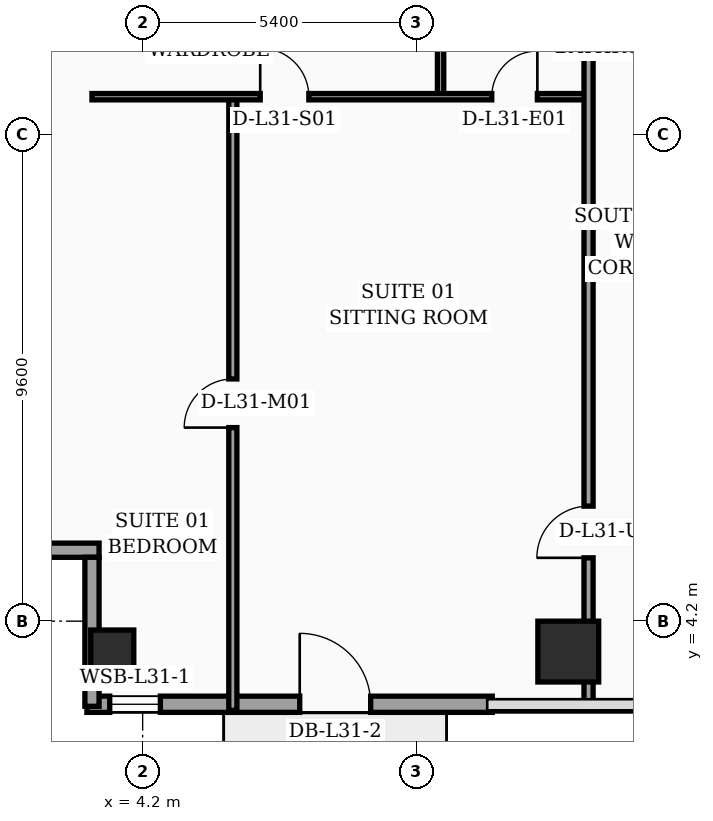
"""IFC4 building model, lengths in metres.
Left out: names, types, materials, properties, quantities, classifications, styles, units other than length and angle.
Written with IfcOpenShell. Run it as: python <this file> out.ifc"""

import sys

from ifc_helpers import new_model, si_unit, direction, frame, frame_2d, origin, origin_2d, place, context, subcontext, project, spatial, rectangle, hollow_rectangle, extrude, element, fill, save


model = new_model("IFC4")
c1 = context("Model", 3, precision=1e-05, world=origin(), true_north=direction((0.0, 1.0)))
c2 = subcontext(c1, "Body", "Model", "MODEL_VIEW")
j1 = project(units=[si_unit("LENGTHUNIT", "METRE"), si_unit("PLANEANGLEUNIT", "RADIAN")], contexts=[c1])
p1 = place(None, origin())
s1 = spatial("IfcSite", under=j1, at=p1, CompositionType="ELEMENT")
p2 = place(p1, origin())
s2 = spatial("IfcBuilding", under=s1, at=p2, CompositionType="ELEMENT")
p3 = place(p2, frame((0.0, 0.0, 127.8)))
s3 = spatial("IfcBuildingStorey", under=s2, at=p3, CompositionType="ELEMENT", Elevation=127.8)
p4 = place(p3, frame((3.6, 3.6, 0.0), z_axis=(0.0, 0.0, 1.0), x_axis=(1.0, 0.0, 0.0)))
e1 = element("IfcColumn", 1, at=p4, inside=s3, PredefinedType="COLUMN", context=c2, shape_type="SweptSolid", body=[
    extrude(hollow_rectangle(XDim=0.85, YDim=0.85, WallThickness=0.036, at=origin_2d()), origin(), (0.0, 0.0, 1.0), 3.56),
])
p5 = place(p3, frame((12.6, 3.6, 0.0), z_axis=(0.0, 0.0, 1.0), x_axis=(1.0, 0.0, 0.0)))
e2 = element("IfcColumn", 2, at=p5, inside=s3, PredefinedType="COLUMN", context=c2, shape_type="SweptSolid", body=[
    extrude(rectangle(XDim=1.2, YDim=1.2, at=origin_2d()), origin(), (0.0, 0.0, 1.0), 3.56),
])
p6 = place(p3, frame((3.1, 2.56, 0.0), z_axis=(0.0, 0.0, 1.0), x_axis=(1.0, 0.0, 0.0)))
e3 = element("IfcWall", 3, at=p6, inside=s3, PredefinedType="SOLIDWALL", context=c2, shape_type="SweptSolid", body=[
    extrude(rectangle(XDim=8.0, YDim=0.32, at=frame_2d((4.0, 0.0))), origin(), (0.0, 0.0, 1.0), 3.56),
])
p7 = place(p6, frame((0.45, 0.0, 0.75)))
e4 = element("IfcOpeningElement", 4, at=p7, cuts=e3, PredefinedType="OPENING", context=c2, shape_type="SweptSolid", body=[
    extrude(rectangle(XDim=1.0, YDim=1.6, at=frame_2d((0.5, 0.8))), frame((0.0, 0.17, 0.0), z_axis=(0.0, -1.0, 0.0), x_axis=(1.0, 0.0, 0.0)), (0.0, 0.0, 1.0), 0.34),
])
p8 = place(p6, frame((4.2, 0.0, 0.0)))
e5 = element("IfcOpeningElement", 5, at=p8, cuts=e3, PredefinedType="OPENING", context=c2, shape_type="SweptSolid", body=[
    extrude(rectangle(XDim=1.4, YDim=2.25, at=frame_2d((0.7, 1.125))), frame((0.0, 0.17, 0.0), z_axis=(0.0, -1.0, 0.0), x_axis=(1.0, 0.0, 0.0)), (0.0, 0.0, 1.0), 0.34),
])
p9 = place(p3, frame((0.12, 5.6, 0.0), z_axis=(0.0, 0.0, 1.0), x_axis=(1.0, 0.0, 0.0)))
e6 = element("IfcWall", 6, at=p9, inside=s3, PredefinedType="SOLIDWALL", context=c2, shape_type="SweptSolid", body=[
    extrude(rectangle(XDim=3.22, YDim=0.28, at=frame_2d((1.61, 0.0))), origin(), (0.0, 0.0, 1.0), 2.84),
])
p10 = place(p3, frame((3.2, 5.46, 0.0), z_axis=(0.0, 0.0, 1.0), x_axis=(0.0, -1.0, 0.0)))
e7 = element("IfcWall", 7, at=p10, inside=s3, PredefinedType="SOLIDWALL", context=c2, shape_type="SweptSolid", body=[
    extrude(rectangle(XDim=2.94, YDim=0.28, at=frame_2d((1.47, 0.0))), origin(), (0.0, 0.0, 1.0), 2.84),
])
p11 = place(p3, frame((10.08, 14.55, 0.0), z_axis=(0.0, 0.0, 1.0), x_axis=(0.0, 1.0, 0.0)))
e8 = element("IfcWall", 8, at=p11, inside=s3, PredefinedType="PARTITIONING", context=c2, shape_type="SweptSolid", body=[
    extrude(rectangle(XDim=2.25, YDim=0.125, at=frame_2d((1.125, 0.0))), origin(), (0.0, 0.0, 1.0), 3.56),
])
p12 = place(p3, frame((5.98, 2.44, 0.0), z_axis=(0.0, 0.0, 1.0), x_axis=(0.0, 1.0, 0.0)))
e9 = element("IfcWall", 9, at=p12, inside=s3, PredefinedType="PARTITIONING", context=c2, shape_type="SweptSolid", body=[
    extrude(rectangle(XDim=12.11, YDim=0.16, at=frame_2d((6.055, 0.0))), origin(), (0.0, 0.0, 1.0), 3.04),
])
p13 = place(p12, frame((5.58, 0.0, 0.0)))
e10 = element("IfcOpeningElement", 10, at=p13, cuts=e9, PredefinedType="OPENING", context=c2, shape_type="SweptSolid", body=[
    extrude(rectangle(XDim=0.96, YDim=2.2, at=frame_2d((0.48, 1.1))), frame((0.0, 0.09, 0.0), z_axis=(0.0, -1.0, 0.0), x_axis=(1.0, 0.0, 0.0)), (0.0, 0.0, 1.0), 0.18),
])
p14 = place(p3, frame((3.2, 14.55, 0.0), z_axis=(0.0, 0.0, 1.0), x_axis=(1.0, 0.0, 0.0)))
e11 = element("IfcWall", 11, at=p14, inside=s3, PredefinedType="PARTITIONING", context=c2, shape_type="SweptSolid", body=[
    extrude(rectangle(XDim=9.8, YDim=0.125, at=frame_2d((4.9, 0.0))), origin(), (0.0, 0.0, 1.0), 2.84),
])
p15 = place(p14, frame((3.32, 0.0, 0.0)))
e12 = element("IfcOpeningElement", 12, at=p15, cuts=e11, PredefinedType="OPENING", context=c2, shape_type="SweptSolid", body=[
    extrude(rectangle(XDim=0.96, YDim=2.2, at=frame_2d((0.48, 1.1))), frame((0.0, 0.073, 0.0), z_axis=(0.0, -1.0, 0.0), x_axis=(1.0, 0.0, 0.0)), (0.0, 0.0, 1.0), 0.145),
])
p16 = place(p14, frame((7.89, 0.0, 0.0)))
e13 = element("IfcOpeningElement", 13, at=p16, cuts=e11, PredefinedType="OPENING", context=c2, shape_type="SweptSolid", body=[
    extrude(rectangle(XDim=0.9, YDim=2.15, at=frame_2d((0.45, 1.075))), frame((0.0, 0.073, 0.0), z_axis=(0.0, -1.0, 0.0), x_axis=(1.0, 0.0, 0.0)), (0.0, 0.0, 1.0), 0.145),
])
p17 = place(p3, frame((13.0, 2.44, 0.0), z_axis=(0.0, 0.0, 1.0), x_axis=(0.0, 1.0, 0.0)))
e14 = element("IfcWall", 14, at=p17, inside=s3, PredefinedType="PARTITIONING", context=c2, shape_type="SweptSolid", body=[
    extrude(rectangle(XDim=14.36, YDim=0.18, at=frame_2d((7.18, 0.0))), origin(), (0.0, 0.0, 1.0), 2.84),
])
p18 = place(p17, frame((3.01, 0.0, 0.0)))
e15 = element("IfcOpeningElement", 15, at=p18, cuts=e14, PredefinedType="OPENING", context=c2, shape_type="SweptSolid", body=[
    extrude(rectangle(XDim=1.02, YDim=2.2, at=frame_2d((0.51, 1.1))), frame((0.0, 0.1, 0.0), z_axis=(0.0, -1.0, 0.0), x_axis=(1.0, 0.0, 0.0)), (0.0, 0.0, 1.0), 0.2),
])
p19 = place(p7, origin())
e16 = element("IfcWindow", 16, at=p19, inside=s3, PartitioningType="SINGLE_PANEL", PredefinedType="WINDOW", context=c2, shape_type="SweptSolid", body=[
    extrude(rectangle(XDim=1.0, YDim=1.6, at=frame_2d((0.5, 0.8))), frame((0.0, 0.03, 0.0), z_axis=(0.0, -1.0, 0.0), x_axis=(1.0, 0.0, 0.0)), (0.0, 0.0, 1.0), 0.06),
])
fill(e4, e16)
p20 = place(p8, origin())
e17 = element("IfcDoor", 17, at=p20, inside=s3, OperationType="SINGLE_SWING_LEFT", PredefinedType="DOOR", context=c2, shape_type="SweptSolid", body=[
    extrude(rectangle(XDim=1.4, YDim=2.25, at=frame_2d((0.7, 1.125))), frame((0.0, 0.025, 0.0), z_axis=(0.0, -1.0, 0.0), x_axis=(1.0, 0.0, 0.0)), (0.0, 0.0, 1.0), 0.05),
])
fill(e5, e17)
p21 = place(p13, origin())
e18 = element("IfcDoor", 18, at=p21, inside=s3, OperationType="SINGLE_SWING_LEFT", PredefinedType="DOOR", context=c2, shape_type="SweptSolid", body=[
    extrude(rectangle(XDim=0.96, YDim=2.2, at=frame_2d((0.48, 1.1))), frame((0.0, 0.025, 0.0), z_axis=(0.0, -1.0, 0.0), x_axis=(1.0, 0.0, 0.0)), (0.0, 0.0, 1.0), 0.05),
])
fill(e10, e18)
p22 = place(p15, origin())
e19 = element("IfcDoor", 19, at=p22, inside=s3, OperationType="SINGLE_SWING_LEFT", PredefinedType="DOOR", context=c2, shape_type="SweptSolid", body=[
    extrude(rectangle(XDim=0.96, YDim=2.2, at=frame_2d((0.48, 1.1))), frame((0.0, 0.025, 0.0), z_axis=(0.0, -1.0, 0.0), x_axis=(1.0, 0.0, 0.0)), (0.0, 0.0, 1.0), 0.05),
])
fill(e12, e19)
p23 = place(p16, origin())
e20 = element("IfcDoor", 20, at=p23, inside=s3, OperationType="SINGLE_SWING_RIGHT", PredefinedType="DOOR", context=c2, shape_type="SweptSolid", body=[
    extrude(rectangle(XDim=0.9, YDim=2.15, at=frame_2d((0.45, 1.075))), frame((0.0, 0.025, 0.0), z_axis=(0.0, -1.0, 0.0), x_axis=(1.0, 0.0, 0.0)), (0.0, 0.0, 1.0), 0.05),
])
fill(e13, e20)
p24 = place(p18, origin())
e21 = element("IfcDoor", 21, at=p24, inside=s3, OperationType="SINGLE_SWING_LEFT", PredefinedType="DOOR", context=c2, shape_type="SweptSolid", body=[
    extrude(rectangle(XDim=1.02, YDim=2.2, at=frame_2d((0.51, 1.1))), frame((0.0, 0.025, 0.0), z_axis=(0.0, -1.0, 0.0), x_axis=(1.0, 0.0, 0.0)), (0.0, 0.0, 1.0), 0.05),
])
fill(e15, e21)
save(model, sys.argv[1])
